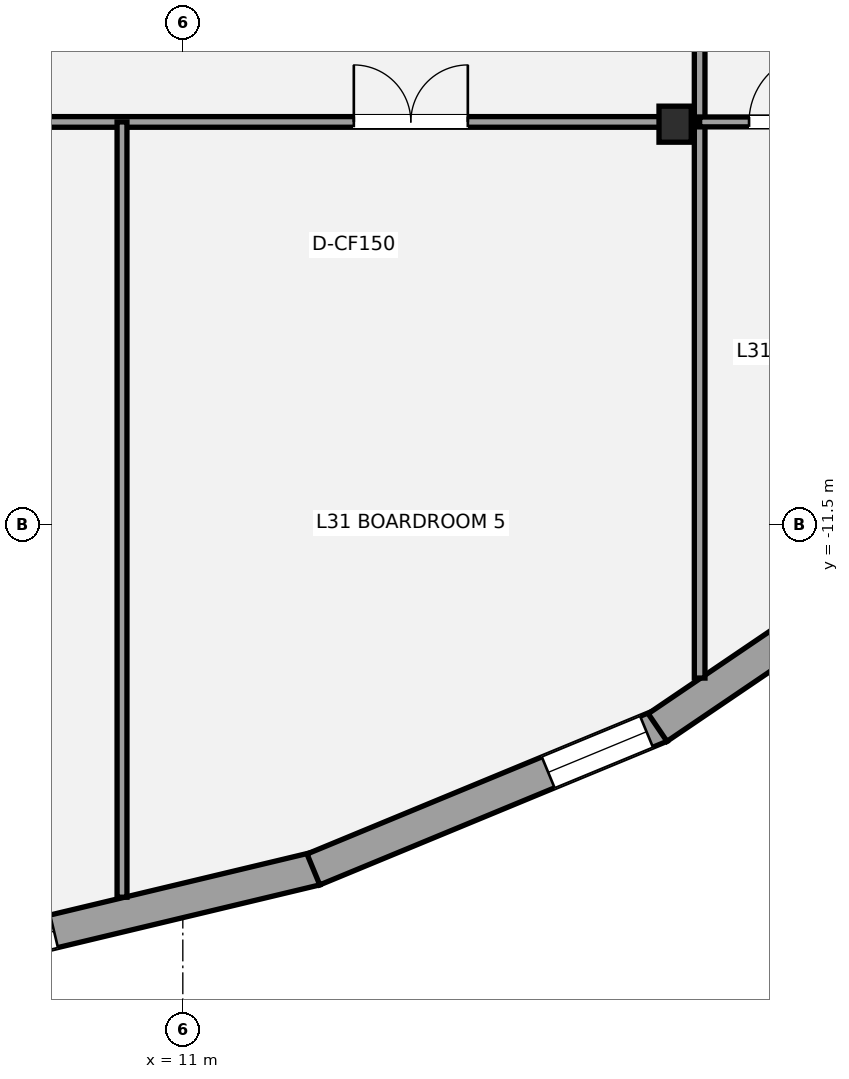
"""IFC4 building model, lengths in metres.
Left out: names, types, materials, properties, quantities, classifications, styles, units other than length and angle.
Written with IfcOpenShell. Run it as: python <this file> out.ifc"""

import sys

from ifc_helpers import new_model, si_unit, direction, frame, frame_2d, origin, origin_2d, place, context, subcontext, project, spatial, rectangle, i_section, extrude, element, fill, save


model = new_model("IFC4")
c1 = context("Model", 3, precision=1e-05, world=origin(), true_north=direction((0.0, 1.0)))
c2 = subcontext(c1, "Body", "Model", "MODEL_VIEW")
j1 = project(units=[si_unit("LENGTHUNIT", "METRE"), si_unit("PLANEANGLEUNIT", "RADIAN")], contexts=[c1])
p1 = place(None, origin())
s1 = spatial("IfcSite", under=j1, at=p1, CompositionType="ELEMENT")
p2 = place(p1, origin())
s2 = spatial("IfcBuilding", under=s1, at=p2, CompositionType="ELEMENT")
p3 = place(p2, frame((0.0, 0.0, 117.6)))
s3 = spatial("IfcBuildingStorey", under=s2, at=p3, CompositionType="ELEMENT", Elevation=117.6)
p4 = place(p3, frame((17.477, -6.229, 0.0), z_axis=(0.0, 0.0, 1.0), x_axis=(1.0, 0.0, 0.0)))
e1 = element("IfcColumn", 1, at=p4, inside=s3, PredefinedType="COLUMN", context=c2, shape_type="SweptSolid", body=[
    extrude(i_section(OverallWidth=0.424, OverallDepth=0.474, WebThickness=0.048, FlangeThickness=0.077, at=origin_2d()), origin(), (0.0, 0.0, 1.0), 3.5),
])
p5 = place(p3, frame((12.751, -16.024, 0.0), z_axis=(0.0, 0.0, 1.0), x_axis=(-0.972539655933, -0.232737228734, 0.0)))
e2 = element("IfcWall", 2, at=p5, inside=s3, PredefinedType="STANDARD", context=c2, shape_type="SweptSolid", body=[
    extrude(rectangle(XDim=5.142, YDim=0.44, at=frame_2d((2.571, 0.0))), origin(), (0.0, 0.0, 1.0), 2.528),
])
p6 = place(p5, frame((3.542, 0.0, 0.45)))
e3 = element("IfcOpeningElement", 3, at=p6, cuts=e2, PredefinedType="OPENING", context=c2, shape_type="SweptSolid", body=[
    extrude(rectangle(XDim=1.4, YDim=1.55, at=frame_2d((0.7, 0.775))), frame((0.0, 0.23, 0.0), z_axis=(0.0, -1.0, 0.0), x_axis=(1.0, 0.0, 0.0)), (0.0, 0.0, 1.0), 0.46),
])
p7 = place(p3, frame((17.286, -14.146, 0.0), z_axis=(0.0, 0.0, 1.0), x_axis=(-0.924140141084, -0.382053660678, 0.0)))
e4 = element("IfcWall", 4, at=p7, inside=s3, PredefinedType="STANDARD", context=c2, shape_type="SweptSolid", body=[
    extrude(rectangle(XDim=4.943, YDim=0.44, at=frame_2d((2.471, 0.0))), origin(), (0.0, 0.0, 1.0), 2.528),
])
p8 = place(p7, frame((0.2, 0.0, 0.45)))
e5 = element("IfcOpeningElement", 5, at=p8, cuts=e4, PredefinedType="OPENING", context=c2, shape_type="SweptSolid", body=[
    extrude(rectangle(XDim=1.4, YDim=1.55, at=frame_2d((0.7, 0.775))), frame((0.0, 0.23, 0.0), z_axis=(0.0, -1.0, 0.0), x_axis=(1.0, 0.0, 0.0)), (0.0, 0.0, 1.0), 0.46),
])
p9 = place(p3, frame((21.042, -11.594, 0.0), z_axis=(0.0, 0.0, 1.0), x_axis=(-0.827700115196, -0.561170668607, 0.0)))
e6 = element("IfcWall", 6, at=p9, inside=s3, PredefinedType="STANDARD", context=c2, shape_type="SweptSolid", body=[
    extrude(rectangle(XDim=4.585, YDim=0.44, at=frame_2d((2.293, 0.0))), origin(), (0.0, 0.0, 1.0), 2.528),
])
p10 = place(p9, frame((0.349, 0.0, 0.58)))
e7 = element("IfcOpeningElement", 7, at=p10, cuts=e6, PredefinedType="OPENING", context=c2, shape_type="SweptSolid", body=[
    extrude(rectangle(XDim=0.9, YDim=1.35, at=frame_2d((0.45, 0.675))), frame((0.0, 0.23, 0.0), z_axis=(0.0, -1.0, 0.0), x_axis=(1.0, 0.0, 0.0)), (0.0, 0.0, 1.0), 0.46),
])
p11 = place(p3, frame((-16.2, -6.2, 0.0), z_axis=(0.0, 0.0, 1.0), x_axis=(1.0, 0.0, 0.0)))
e8 = element("IfcWall", 8, at=p11, inside=s3, PredefinedType="PARTITIONING", context=c2, shape_type="SweptSolid", body=[
    extrude(rectangle(XDim=34.0, YDim=0.14, at=frame_2d((17.0, 0.0))), origin(), (0.0, 0.0, 1.0), 2.688),
])
p12 = place(p11, frame((2.75, 0.0, 0.0)))
e9 = element("IfcOpeningElement", 9, at=p12, cuts=e8, PredefinedType="OPENING", context=c2, shape_type="SweptSolid", body=[
    extrude(rectangle(XDim=0.9, YDim=2.1, at=frame_2d((0.45, 1.05))), frame((0.0, 0.08, 0.0), z_axis=(0.0, -1.0, 0.0), x_axis=(1.0, 0.0, 0.0)), (0.0, 0.0, 1.0), 0.16),
])
p13 = place(p11, frame((9.45, 0.0, 0.0)))
e10 = element("IfcOpeningElement", 10, at=p13, cuts=e8, PredefinedType="OPENING", context=c2, shape_type="SweptSolid", body=[
    extrude(rectangle(XDim=0.9, YDim=2.1, at=frame_2d((0.45, 1.05))), frame((0.0, 0.08, 0.0), z_axis=(0.0, -1.0, 0.0), x_axis=(1.0, 0.0, 0.0)), (0.0, 0.0, 1.0), 0.16),
])
p14 = place(p11, frame((16.45, 0.0, 0.0)))
e11 = element("IfcOpeningElement", 11, at=p14, cuts=e8, PredefinedType="OPENING", context=c2, shape_type="SweptSolid", body=[
    extrude(rectangle(XDim=0.9, YDim=2.1, at=frame_2d((0.45, 1.05))), frame((0.0, 0.08, 0.0), z_axis=(0.0, -1.0, 0.0), x_axis=(1.0, 0.0, 0.0)), (0.0, 0.0, 1.0), 0.16),
])
p15 = place(p11, frame((22.95, 0.0, 0.0)))
e12 = element("IfcOpeningElement", 12, at=p15, cuts=e8, PredefinedType="OPENING", context=c2, shape_type="SweptSolid", body=[
    extrude(rectangle(XDim=0.9, YDim=2.1, at=frame_2d((0.45, 1.05))), frame((0.0, 0.08, 0.0), z_axis=(0.0, -1.0, 0.0), x_axis=(1.0, 0.0, 0.0)), (0.0, 0.0, 1.0), 0.16),
])
p16 = place(p11, frame((29.45, 0.0, 0.0)))
e13 = element("IfcOpeningElement", 13, at=p16, cuts=e8, PredefinedType="OPENING", context=c2, shape_type="SweptSolid", body=[
    extrude(rectangle(XDim=1.5, YDim=2.15, at=frame_2d((0.75, 1.075))), frame((0.0, 0.08, 0.0), z_axis=(0.0, -1.0, 0.0), x_axis=(1.0, 0.0, 0.0)), (0.0, 0.0, 1.0), 0.16),
])
p17 = place(p3, frame((17.8, -13.517, 0.0), z_axis=(0.0, 0.0, 1.0), x_axis=(0.0, 1.0, 0.0)))
e14 = element("IfcWall", 14, at=p17, inside=s3, PredefinedType="PARTITIONING", context=c2, shape_type="SweptSolid", body=[
    extrude(rectangle(XDim=21.067, YDim=0.14, at=frame_2d((10.533, 0.0))), origin(), (0.0, 0.0, 1.0), 2.688),
])
p18 = place(p17, frame((11.167, 0.0, 0.0)))
e15 = element("IfcOpeningElement", 15, at=p18, cuts=e14, PredefinedType="OPENING", context=c2, shape_type="SweptSolid", body=[
    extrude(rectangle(XDim=0.9, YDim=2.1, at=frame_2d((0.45, 1.05))), frame((0.0, 0.08, 0.0), z_axis=(0.0, -1.0, 0.0), x_axis=(1.0, 0.0, 0.0)), (0.0, 0.0, 1.0), 0.16),
])
p19 = place(p17, frame((18.042, 0.0, 0.0)))
e16 = element("IfcOpeningElement", 16, at=p19, cuts=e14, PredefinedType="OPENING", context=c2, shape_type="SweptSolid", body=[
    extrude(rectangle(XDim=0.9, YDim=2.1, at=frame_2d((0.45, 1.05))), frame((0.0, 0.08, 0.0), z_axis=(0.0, -1.0, 0.0), x_axis=(1.0, 0.0, 0.0)), (0.0, 0.0, 1.0), 0.16),
])
p20 = place(p3, frame((10.2, -16.4, 0.0), z_axis=(0.0, 0.0, 1.0), x_axis=(0.0, 1.0, 0.0)))
e17 = element("IfcWall", 17, at=p20, inside=s3, PredefinedType="PARTITIONING", context=c2, shape_type="SweptSolid", body=[
    extrude(rectangle(XDim=10.2, YDim=0.13, at=frame_2d((5.1, 0.0))), origin(), (0.0, 0.0, 1.0), 3.31),
])
p21 = place(p3, frame((17.8, -6.2, 0.0), z_axis=(0.0, 0.0, 1.0), x_axis=(1.0, 0.0, 0.0)))
e18 = element("IfcWall", 18, at=p21, inside=s3, PredefinedType="PARTITIONING", context=c2, shape_type="SweptSolid", body=[
    extrude(rectangle(XDim=6.937, YDim=0.13, at=frame_2d((3.468, 0.0))), origin(), (0.0, 0.0, 1.0), 2.763),
])
p22 = place(p21, frame((0.65, 0.0, 0.0)))
e19 = element("IfcOpeningElement", 19, at=p22, cuts=e18, PredefinedType="OPENING", context=c2, shape_type="SweptSolid", body=[
    extrude(rectangle(XDim=0.9, YDim=2.1, at=frame_2d((0.45, 1.05))), frame((0.0, 0.075, 0.0), z_axis=(0.0, -1.0, 0.0), x_axis=(1.0, 0.0, 0.0)), (0.0, 0.0, 1.0), 0.15),
])
p23 = place(p6, origin())
e20 = element("IfcWindow", 20, at=p23, inside=s3, PartitioningType="SINGLE_PANEL", PredefinedType="WINDOW", context=c2, shape_type="SweptSolid", body=[
    extrude(rectangle(XDim=1.4, YDim=1.55, at=frame_2d((0.7, 0.775))), frame((0.0, -0.01, 0.0), z_axis=(0.0, -1.0, 0.0), x_axis=(1.0, 0.0, 0.0)), (0.0, 0.0, 1.0), 0.06),
])
fill(e3, e20)
p24 = place(p8, origin())
e21 = element("IfcWindow", 21, at=p24, inside=s3, PartitioningType="SINGLE_PANEL", PredefinedType="WINDOW", context=c2, shape_type="SweptSolid", body=[
    extrude(rectangle(XDim=1.4, YDim=1.55, at=frame_2d((0.7, 0.775))), frame((0.0, -0.01, 0.0), z_axis=(0.0, -1.0, 0.0), x_axis=(1.0, 0.0, 0.0)), (0.0, 0.0, 1.0), 0.06),
])
fill(e5, e21)
p25 = place(p16, origin())
e22 = element("IfcDoor", 22, at=p25, inside=s3, OperationType="DOUBLE_DOOR_SINGLE_SWING", PredefinedType="DOOR", context=c2, shape_type="SweptSolid", body=[
    extrude(rectangle(XDim=1.5, YDim=2.15, at=frame_2d((0.75, 1.075))), frame((0.0, 0.025, 0.0), z_axis=(0.0, -1.0, 0.0), x_axis=(1.0, 0.0, 0.0)), (0.0, 0.0, 1.0), 0.05),
])
fill(e13, e22)
p26 = place(p22, origin())
e23 = element("IfcDoor", 23, at=p26, inside=s3, OperationType="SINGLE_SWING_RIGHT", PredefinedType="DOOR", context=c2, shape_type="SweptSolid", body=[
    extrude(rectangle(XDim=0.9, YDim=2.1, at=frame_2d((0.45, 1.05))), frame((0.0, 0.025, 0.0), z_axis=(0.0, -1.0, 0.0), x_axis=(1.0, 0.0, 0.0)), (0.0, 0.0, 1.0), 0.05),
])
fill(e19, e23)
save(model, sys.argv[1])
